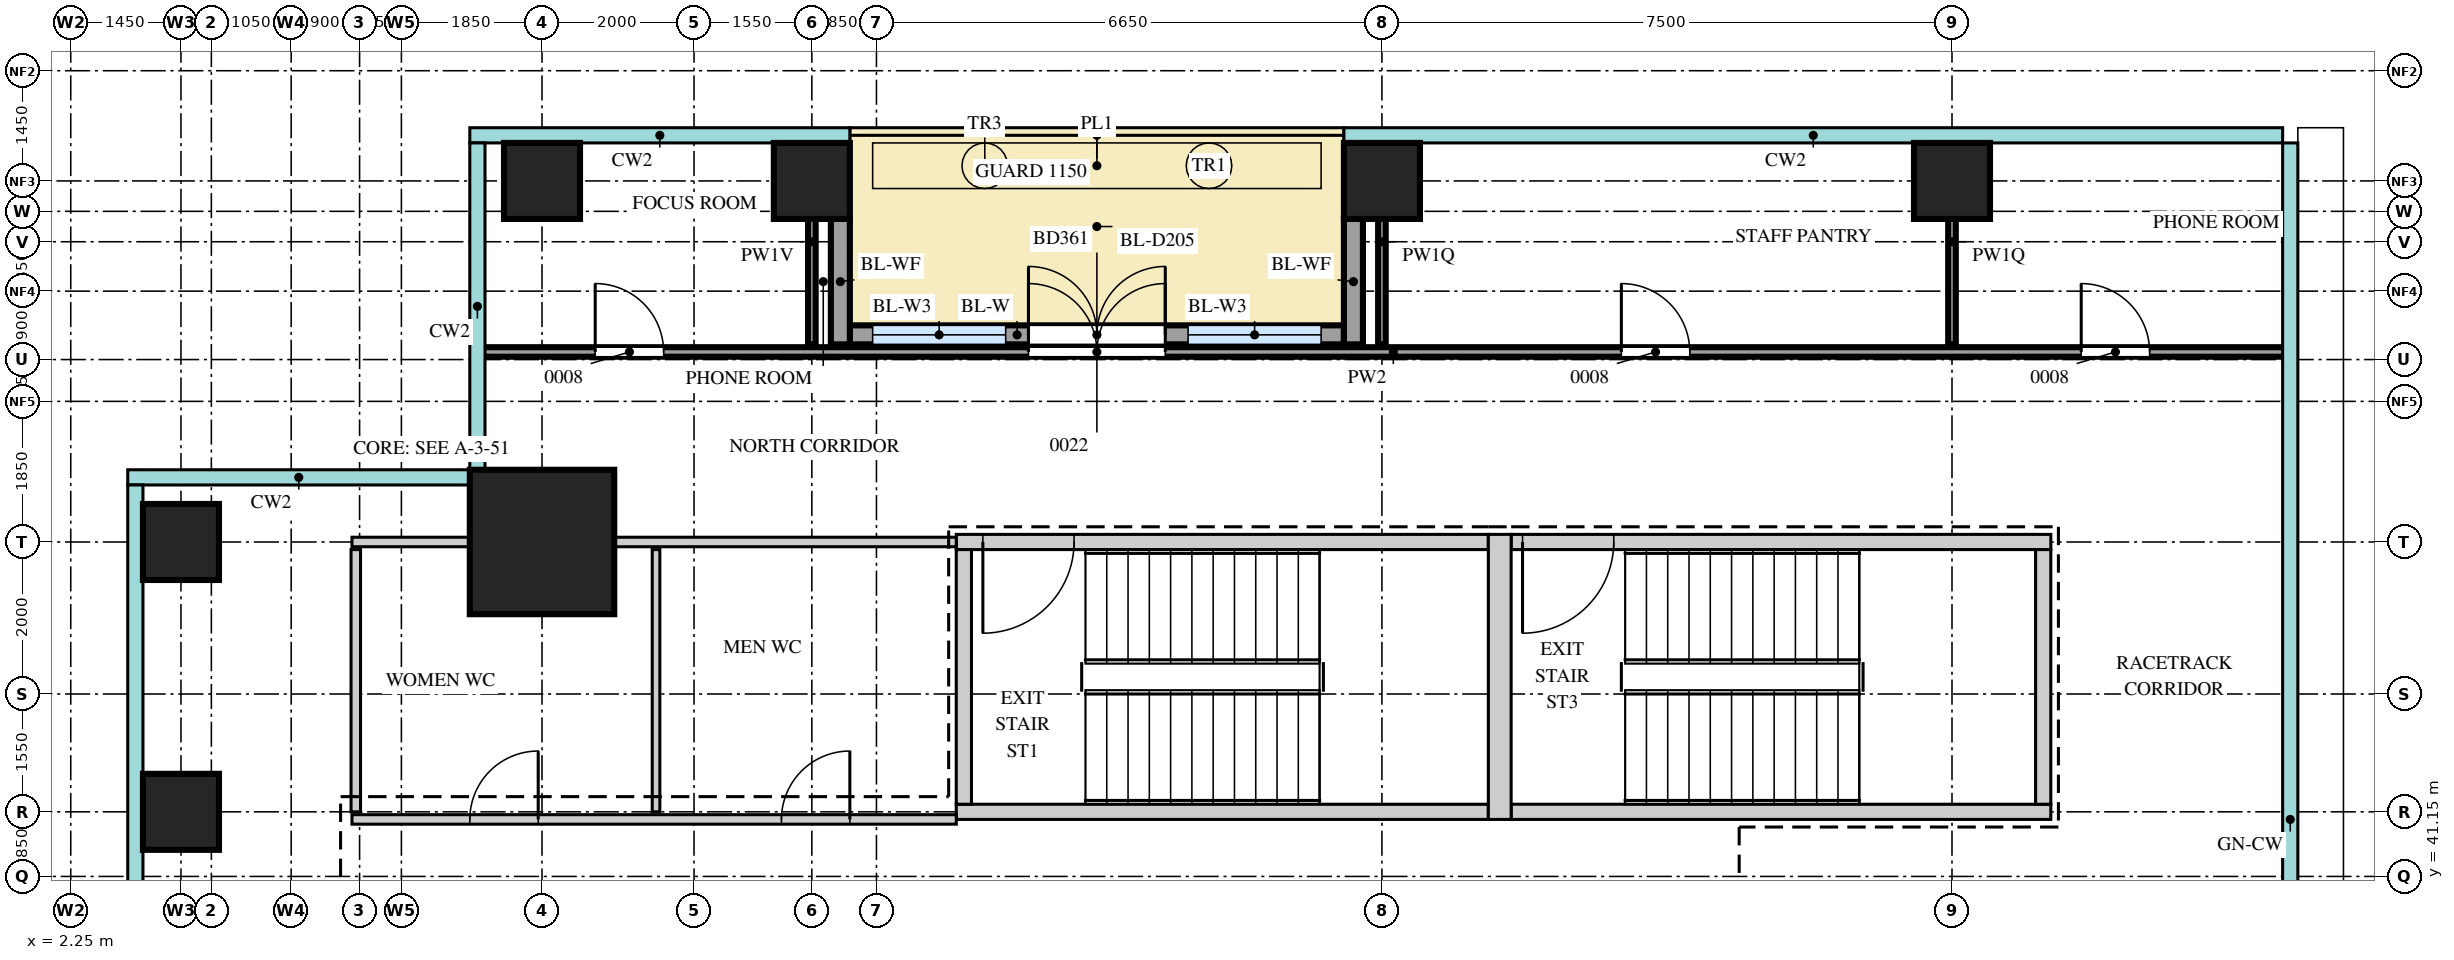
"""IFC4 building model, lengths in metres.
Left out: names, types, materials, properties, quantities, classifications, styles, units other than length and angle.
Written with IfcOpenShell. Run it as: python <this file> out.ifc"""

import sys

from ifc_helpers import new_model, si_unit, direction, frame, frame_2d, origin, origin_2d, place, context, subcontext, project, spatial, rectangle, extrude, source, transform, mapped, element, fill, save


model = new_model("IFC4")
c1 = context("Model", 3, precision=1e-05, world=origin(), true_north=direction((0.0, 1.0)))
c2 = subcontext(c1, "Body", "Model", "MODEL_VIEW")
j1 = project(units=[si_unit("LENGTHUNIT", "METRE"), si_unit("PLANEANGLEUNIT", "RADIAN")], contexts=[c1])
p1 = place(None, origin())
s1 = spatial("IfcSite", under=j1, at=p1, CompositionType="ELEMENT")
p2 = place(p1, origin())
s2 = spatial("IfcBuilding", under=s1, at=p2, CompositionType="ELEMENT")
p3 = place(p2, frame((0.0, 0.0, 168.7)))
s3 = spatial("IfcBuildingStorey", under=s2, at=p3, CompositionType="ELEMENT", Elevation=168.7)
m1 = source(origin(), c2, "Body", "SweptSolid", [
    extrude(rectangle(XDim=7.0, YDim=0.2, at=frame_2d((3.5, 0.0))), origin(), (0.0, 0.0, 1.0), 3.75),
])
p4 = place(p3, frame((13.9, 45.55, 0.0), z_axis=(0.0, 0.0, 1.0), x_axis=(1.0, 0.0, 0.0)))
e1 = element("IfcWall", 1, at=p4, inside=s3, PredefinedType="SHEAR", context=c2, shape_type="MappedRepresentation", body=[
    mapped(m1, transform((0.0, 0.0, 0.0))),
])
m2 = source(origin(), c2, "Body", "SweptSolid", [
    extrude(rectangle(XDim=1.2, YDim=2.1, at=frame_2d((0.6, 1.05))), frame((0.0, 0.11, 0.0), z_axis=(0.0, -1.0, 0.0), x_axis=(1.0, 0.0, 0.0)), (0.0, 0.0, 1.0), 0.22),
])
p5 = place(p4, frame((0.35, 0.0, 0.0)))
e2 = element("IfcOpeningElement", 2, at=p5, cuts=e1, PredefinedType="OPENING", context=c2, shape_type="MappedRepresentation", body=[
    mapped(m2, transform((0.0, 0.0, 0.0))),
])
p6 = place(p3, frame((13.9, 42.0, 0.0), z_axis=(0.0, 0.0, 1.0), x_axis=(1.0, 0.0, 0.0)))
e3 = element("IfcWall", 3, at=p6, inside=s3, PredefinedType="SHEAR", context=c2, shape_type="MappedRepresentation", body=[
    mapped(m1, transform((0.0, 0.0, 0.0))),
])
m3 = source(origin(), c2, "Body", "SweptSolid", [
    extrude(rectangle(XDim=7.1, YDim=0.2, at=frame_2d((3.55, 0.0))), origin(), (0.0, 0.0, 1.0), 3.75),
])
p7 = place(p3, frame((21.2, 45.55, 0.0), z_axis=(0.0, 0.0, 1.0), x_axis=(1.0, 0.0, 0.0)))
e4 = element("IfcWall", 4, at=p7, inside=s3, PredefinedType="SHEAR", context=c2, shape_type="MappedRepresentation", body=[
    mapped(m3, transform((0.0, 0.0, 0.0))),
])
p8 = place(p7, frame((0.15, 0.0, 0.0)))
e5 = element("IfcOpeningElement", 5, at=p8, cuts=e4, PredefinedType="OPENING", context=c2, shape_type="MappedRepresentation", body=[
    mapped(m2, transform((0.0, 0.0, 0.0))),
])
p9 = place(p3, frame((21.2, 42.0, 0.0), z_axis=(0.0, 0.0, 1.0), x_axis=(1.0, 0.0, 0.0)))
e6 = element("IfcWall", 6, at=p9, inside=s3, PredefinedType="SHEAR", context=c2, shape_type="MappedRepresentation", body=[
    mapped(m3, transform((0.0, 0.0, 0.0))),
])
m4 = source(origin(), c2, "Body", "SweptSolid", [
    extrude(rectangle(XDim=3.75, YDim=0.3, at=frame_2d((1.875, 0.0))), origin(), (0.0, 0.0, 1.0), 3.75),
])
p10 = place(p3, frame((21.05, 41.9, 0.0), z_axis=(0.0, 0.0, 1.0), x_axis=(0.0, 1.0, 0.0)))
e7 = element("IfcWall", 7, at=p10, inside=s3, PredefinedType="SHEAR", context=c2, shape_type="MappedRepresentation", body=[
    mapped(m4, transform((0.0, 0.0, 0.0))),
])
m5 = source(origin(), c2, "Body", "SweptSolid", [
    extrude(rectangle(XDim=3.35, YDim=0.2, at=frame_2d((1.675, 0.0))), origin(), (0.0, 0.0, 1.0), 3.75),
])
for number, where, z_axis, x_axis in (
    (8, (14.0, 42.1, 0.0), (0.0, 0.0, 1.0), (0.0, 1.0, 0.0)),
    (9, (28.2, 42.1, 0.0), (0.0, 0.0, 1.0), (0.0, 1.0, 0.0)),
):
    element("IfcWall", number, at=place(p3, frame(where, z_axis=z_axis, x_axis=x_axis)), inside=s3, PredefinedType="SHEAR", context=c2, shape_type="MappedRepresentation", body=[
        mapped(m5, transform((0.0, 0.0, 0.0))),
    ])
m6 = source(origin(), c2, "Body", "SweptSolid", [
    extrude(rectangle(XDim=1.9, YDim=1.9, at=origin_2d()), origin(), (0.0, 0.0, 1.0), 4.0),
])
p11 = place(p3, frame((8.45, 45.55, 0.0), z_axis=(0.0, 0.0, 1.0), x_axis=(1.0, 0.0, 0.0)))
e10 = element("IfcColumn", 10, at=p11, inside=s3, PredefinedType="COLUMN", context=c2, shape_type="MappedRepresentation", body=[
    mapped(m6, transform((0.0, 0.0, 0.0))),
])
m7 = source(origin(), c2, "Body", "SweptSolid", [
    extrude(rectangle(XDim=1.0, YDim=1.0, at=origin_2d()), origin(), (0.0, 0.0, 1.0), 3.75),
])
for number, where, z_axis, x_axis in (
    (11, (8.45, 50.3, 0.0), (0.0, 0.0, 1.0), (1.0, 0.0, 0.0)),
    (12, (12.0, 50.3, 0.0), (0.0, 0.0, 1.0), (1.0, 0.0, 0.0)),
    (13, (19.5, 50.3, 0.0), (0.0, 0.0, 1.0), (1.0, 0.0, 0.0)),
    (14, (27.0, 50.3, 0.0), (0.0, 0.0, 1.0), (1.0, 0.0, 0.0)),
    (15, (3.7, 42.0, 0.0), (0.0, 0.0, 1.0), (1.0, 0.0, 0.0)),
    (16, (3.7, 45.55, 0.0), (0.0, 0.0, 1.0), (1.0, 0.0, 0.0)),
):
    element("IfcColumn", number, at=place(p3, frame(where, z_axis=z_axis, x_axis=x_axis)), inside=s3, PredefinedType="COLUMN", context=c2, shape_type="MappedRepresentation", body=[
        mapped(m7, transform((0.0, 0.0, 0.0))),
    ])
m8 = source(origin(), c2, "Body", "SweptSolid", [
    extrude(rectangle(XDim=6.5, YDim=0.25, at=frame_2d((3.25, 0.0))), origin(), (0.0, 0.0, 1.0), 3.75),
])
p12 = place(p3, frame((12.5, 48.275, 0.0), z_axis=(0.0, 0.0, 1.0), x_axis=(1.0, 0.0, 0.0)))
e17 = element("IfcWall", 17, at=p12, inside=s3, PredefinedType="SOLIDWALL", context=c2, shape_type="MappedRepresentation", body=[
    mapped(m8, transform((0.0, 0.0, 0.0))),
])
m9 = source(origin(), c2, "Body", "SweptSolid", [
    extrude(rectangle(XDim=1.75, YDim=2.4, at=frame_2d((0.875, 1.2))), frame((0.0, 0.135, 0.0), z_axis=(0.0, -1.0, 0.0), x_axis=(1.0, 0.0, 0.0)), (0.0, 0.0, 1.0), 0.27),
])
p13 = place(p12, frame((0.3, 0.0, 0.0)))
e18 = element("IfcOpeningElement", 18, at=p13, cuts=e17, PredefinedType="OPENING", context=c2, shape_type="MappedRepresentation", body=[
    mapped(m9, transform((0.0, 0.0, 0.0))),
])
p14 = place(p12, frame((4.45, 0.0, 0.0)))
e19 = element("IfcOpeningElement", 19, at=p14, cuts=e17, PredefinedType="OPENING", context=c2, shape_type="MappedRepresentation", body=[
    mapped(m9, transform((0.0, 0.0, 0.0))),
])
m10 = source(origin(), c2, "Body", "SweptSolid", [
    extrude(rectangle(XDim=1.8, YDim=2.4, at=frame_2d((0.9, 1.2))), frame((0.0, 0.135, 0.0), z_axis=(0.0, -1.0, 0.0), x_axis=(1.0, 0.0, 0.0)), (0.0, 0.0, 1.0), 0.27),
])
p15 = place(p12, frame((2.35, 0.0, 0.0)))
e20 = element("IfcOpeningElement", 20, at=p15, cuts=e17, PredefinedType="OPENING", context=c2, shape_type="MappedRepresentation", body=[
    mapped(m10, transform((0.0, 0.0, 0.0))),
])
m11 = source(origin(), c2, "Body", "SweptSolid", [
    extrude(rectangle(XDim=1.65, YDim=0.25, at=frame_2d((0.825, 0.0))), origin(), (0.0, 0.0, 1.0), 3.45),
])
for number, where, z_axis, x_axis in (
    (21, (12.375, 49.8, 0.0), (0.0, 0.0, 1.0), (0.0, -1.0, 0.0)),
    (22, (19.125, 49.8, 0.0), (0.0, 0.0, 1.0), (0.0, -1.0, 0.0)),
):
    element("IfcWall", number, at=place(p3, frame(where, z_axis=z_axis, x_axis=x_axis)), inside=s3, PredefinedType="SOLIDWALL", context=c2, shape_type="MappedRepresentation", body=[
        mapped(m11, transform((0.0, 0.0, 0.0))),
    ])
m12 = source(origin(), c2, "Body", "SweptSolid", [
    extrude(rectangle(XDim=7.95, YDim=0.125, at=frame_2d((3.975, 0.0))), origin(), (0.0, 0.0, 1.0), 3.8),
])
p16 = place(p3, frame((5.95, 41.9, 0.0), z_axis=(0.0, 0.0, 1.0), x_axis=(1.0, 0.0, 0.0)))
e23 = element("IfcWall", 23, at=p16, inside=s3, PredefinedType="PARTITIONING", context=c2, shape_type="MappedRepresentation", body=[
    mapped(m12, transform((0.0, 0.0, 0.0))),
])
m13 = source(origin(), c2, "Body", "SweptSolid", [
    extrude(rectangle(XDim=0.9, YDim=2.1, at=frame_2d((0.45, 1.05))), frame((0.0, 0.073, 0.0), z_axis=(0.0, -1.0, 0.0), x_axis=(1.0, 0.0, 0.0)), (0.0, 0.0, 1.0), 0.145),
])
p17 = place(p16, frame((1.55, 0.0, 0.0)))
e24 = element("IfcOpeningElement", 24, at=p17, cuts=e23, PredefinedType="OPENING", context=c2, shape_type="MappedRepresentation", body=[
    mapped(m13, transform((0.0, 0.0, 0.0))),
])
p18 = place(p16, frame((5.65, 0.0, 0.0)))
e25 = element("IfcOpeningElement", 25, at=p18, cuts=e23, PredefinedType="OPENING", context=c2, shape_type="MappedRepresentation", body=[
    mapped(m13, transform((0.0, 0.0, 0.0))),
])
m14 = source(origin(), c2, "Body", "SweptSolid", [
    extrude(rectangle(XDim=3.45, YDim=0.125, at=frame_2d((1.725, 0.0))), origin(), (0.0, 0.0, 1.0), 3.8),
])
p19 = place(p3, frame((6.0, 42.0, 0.0), z_axis=(0.0, 0.0, 1.0), x_axis=(0.0, 1.0, 0.0)))
e26 = element("IfcWall", 26, at=p19, inside=s3, PredefinedType="PARTITIONING", context=c2, shape_type="MappedRepresentation", body=[
    mapped(m14, transform((0.0, 0.0, 0.0))),
])
m15 = source(origin(), c2, "Body", "SweptSolid", [
    extrude(rectangle(XDim=3.45, YDim=0.1, at=frame_2d((1.725, 0.0))), origin(), (0.0, 0.0, 1.0), 3.8),
])
p20 = place(p3, frame((9.95, 42.0, 0.0), z_axis=(0.0, 0.0, 1.0), x_axis=(0.0, 1.0, 0.0)))
e27 = element("IfcWall", 27, at=p20, inside=s3, PredefinedType="PARTITIONING", context=c2, shape_type="MappedRepresentation", body=[
    mapped(m15, transform((0.0, 0.0, 0.0))),
])
m16 = source(origin(), c2, "Body", "SweptSolid", [
    extrude(rectangle(XDim=7.95, YDim=0.125, at=frame_2d((3.975, 0.0))), origin(), (0.0, 0.0, 1.0), 3.25),
])
p21 = place(p3, frame((5.95, 45.55, 0.0), z_axis=(0.0, 0.0, 1.0), x_axis=(1.0, 0.0, 0.0)))
e28 = element("IfcWall", 28, at=p21, inside=s3, PredefinedType="PARTITIONING", context=c2, shape_type="MappedRepresentation", body=[
    mapped(m16, transform((0.0, 0.0, 0.0))),
])
m17 = source(origin(), c2, "Body", "SweptSolid", [
    extrude(rectangle(XDim=23.75, YDim=0.125, at=frame_2d((11.875, 0.0))), origin(), (0.0, 0.0, 1.0), 3.8),
])
p22 = place(p3, frame((7.65, 48.05, 0.0), z_axis=(0.0, 0.0, 1.0), x_axis=(1.0, 0.0, 0.0)))
e29 = element("IfcWall", 29, at=p22, inside=s3, PredefinedType="PARTITIONING", context=c2, shape_type="MappedRepresentation", body=[
    mapped(m17, transform((0.0, 0.0, 0.0))),
])
p23 = place(p22, frame((1.5, 0.0, 0.0)))
e30 = element("IfcOpeningElement", 30, at=p23, cuts=e29, PredefinedType="OPENING", context=c2, shape_type="MappedRepresentation", body=[
    mapped(m13, transform((0.0, 0.0, 0.0))),
])
m18 = source(origin(), c2, "Body", "SweptSolid", [
    extrude(rectangle(XDim=1.8, YDim=2.1, at=frame_2d((0.9, 1.05))), frame((0.0, 0.073, 0.0), z_axis=(0.0, -1.0, 0.0), x_axis=(1.0, 0.0, 0.0)), (0.0, 0.0, 1.0), 0.145),
])
p24 = place(p22, frame((7.2, 0.0, 0.0)))
e31 = element("IfcOpeningElement", 31, at=p24, cuts=e29, PredefinedType="OPENING", context=c2, shape_type="MappedRepresentation", body=[
    mapped(m18, transform((0.0, 0.0, 0.0))),
])
p25 = place(p22, frame((15.0, 0.0, 0.0)))
e32 = element("IfcOpeningElement", 32, at=p25, cuts=e29, PredefinedType="OPENING", context=c2, shape_type="MappedRepresentation", body=[
    mapped(m13, transform((0.0, 0.0, 0.0))),
])
p26 = place(p22, frame((21.05, 0.0, 0.0)))
e33 = element("IfcOpeningElement", 33, at=p26, cuts=e29, PredefinedType="OPENING", context=c2, shape_type="MappedRepresentation", body=[
    mapped(m13, transform((0.0, 0.0, 0.0))),
])
m19 = source(origin(), c2, "Body", "SweptSolid", [
    extrude(rectangle(XDim=2.7, YDim=0.1, at=frame_2d((1.35, 0.0))), origin(), (0.0, 0.0, 1.0), 3.25),
])
p27 = place(p3, frame((12.0, 48.15, 0.0), z_axis=(0.0, 0.0, 1.0), x_axis=(0.0, 1.0, 0.0)))
e34 = element("IfcWall", 34, at=p27, inside=s3, PredefinedType="PARTITIONING", context=c2, shape_type="MappedRepresentation", body=[
    mapped(m19, transform((0.0, 0.0, 0.0))),
])
m20 = source(origin(), c2, "Body", "SweptSolid", [
    extrude(rectangle(XDim=2.7, YDim=0.1, at=frame_2d((1.35, 0.0))), origin(), (0.0, 0.0, 1.0), 3.42),
])
for number, where, z_axis, x_axis in (
    (35, (19.5, 48.15, 0.0), (0.0, 0.0, 1.0), (0.0, 1.0, 0.0)),
    (36, (27.0, 48.15, 0.0), (0.0, 0.0, 1.0), (0.0, 1.0, 0.0)),
):
    element("IfcWall", number, at=place(p3, frame(where, z_axis=z_axis, x_axis=x_axis)), inside=s3, PredefinedType="PARTITIONING", context=c2, shape_type="MappedRepresentation", body=[
        mapped(m20, transform((0.0, 0.0, 0.0))),
    ])
m21 = source(origin(), c2, "Body", "SweptSolid", [
    extrude(rectangle(XDim=1.75, YDim=2.4, at=frame_2d((0.875, 1.2))), frame((0.0, 0.03, 0.0), z_axis=(0.0, -1.0, 0.0), x_axis=(1.0, 0.0, 0.0)), (0.0, 0.0, 1.0), 0.06),
])
p28 = place(p13, origin())
e37 = element("IfcWindow", 37, at=p28, inside=s3, PartitioningType="SINGLE_PANEL", PredefinedType="WINDOW", context=c2, shape_type="MappedRepresentation", body=[
    mapped(m21, transform((0.0, 0.0, 0.0))),
])
fill(e18, e37)
p29 = place(p14, origin())
e38 = element("IfcWindow", 38, at=p29, inside=s3, PartitioningType="SINGLE_PANEL", PredefinedType="WINDOW", context=c2, shape_type="MappedRepresentation", body=[
    mapped(m21, transform((0.0, 0.0, 0.0))),
])
fill(e19, e38)
m22 = source(origin(), c2, "Body", "SweptSolid", [
    extrude(rectangle(XDim=1.8, YDim=2.4, at=frame_2d((0.9, 1.2))), frame((0.0, 0.025, 0.0), z_axis=(0.0, -1.0, 0.0), x_axis=(1.0, 0.0, 0.0)), (0.0, 0.0, 1.0), 0.05),
])
p30 = place(p15, origin())
e39 = element("IfcDoor", 39, at=p30, inside=s3, OperationType="DOUBLE_DOOR_DOUBLE_SWING", PredefinedType="DOOR", context=c2, shape_type="MappedRepresentation", body=[
    mapped(m22, transform((0.0, 0.0, 0.0))),
])
fill(e20, e39)
m23 = source(origin(), c2, "Body", "SweptSolid", [
    extrude(rectangle(XDim=0.9, YDim=2.1, at=frame_2d((0.45, 1.05))), frame((0.0, 0.025, 0.0), z_axis=(0.0, -1.0, 0.0), x_axis=(1.0, 0.0, 0.0)), (0.0, 0.0, 1.0), 0.05),
])
p31 = place(p17, origin())
e40 = element("IfcDoor", 40, at=p31, inside=s3, OperationType="SINGLE_SWING_LEFT", PredefinedType="DOOR", context=c2, shape_type="MappedRepresentation", body=[
    mapped(m23, transform((0.0, 0.0, 0.0))),
])
fill(e24, e40)
p32 = place(p18, origin())
e41 = element("IfcDoor", 41, at=p32, inside=s3, OperationType="SINGLE_SWING_LEFT", PredefinedType="DOOR", context=c2, shape_type="MappedRepresentation", body=[
    mapped(m23, transform((0.0, 0.0, 0.0))),
])
fill(e25, e41)
p33 = place(p23, origin())
e42 = element("IfcDoor", 42, at=p33, inside=s3, OperationType="SINGLE_SWING_RIGHT", PredefinedType="DOOR", context=c2, shape_type="MappedRepresentation", body=[
    mapped(m23, transform((0.0, 0.0, 0.0))),
])
fill(e30, e42)
m24 = source(origin(), c2, "Body", "SweptSolid", [
    extrude(rectangle(XDim=1.8, YDim=2.1, at=frame_2d((0.9, 1.05))), frame((0.0, 0.025, 0.0), z_axis=(0.0, -1.0, 0.0), x_axis=(1.0, 0.0, 0.0)), (0.0, 0.0, 1.0), 0.05),
])
p34 = place(p24, origin())
e43 = element("IfcDoor", 43, at=p34, inside=s3, OperationType="DOUBLE_DOOR_SINGLE_SWING", PredefinedType="DOOR", context=c2, shape_type="MappedRepresentation", body=[
    mapped(m24, transform((0.0, 0.0, 0.0))),
])
fill(e31, e43)
p35 = place(p25, origin())
e44 = element("IfcDoor", 44, at=p35, inside=s3, OperationType="SINGLE_SWING_RIGHT", PredefinedType="DOOR", context=c2, shape_type="MappedRepresentation", body=[
    mapped(m23, transform((0.0, 0.0, 0.0))),
])
fill(e32, e44)
p36 = place(p26, origin())
e45 = element("IfcDoor", 45, at=p36, inside=s3, OperationType="SINGLE_SWING_RIGHT", PredefinedType="DOOR", context=c2, shape_type="MappedRepresentation", body=[
    mapped(m23, transform((0.0, 0.0, 0.0))),
])
fill(e33, e45)
m25 = source(origin(), c2, "Body", "SweptSolid", [
    extrude(rectangle(XDim=1.2, YDim=2.1, at=frame_2d((0.6, 1.05))), frame((0.0, 0.025, 0.0), z_axis=(0.0, -1.0, 0.0), x_axis=(1.0, 0.0, 0.0)), (0.0, 0.0, 1.0), 0.05),
])
p37 = place(p5, origin())
e46 = element("IfcDoor", 46, at=p37, inside=s3, OperationType="SINGLE_SWING_LEFT", PredefinedType="DOOR", context=c2, shape_type="MappedRepresentation", body=[
    mapped(m25, transform((0.0, 0.0, 0.0))),
])
fill(e2, e46)
p38 = place(p8, origin())
e47 = element("IfcDoor", 47, at=p38, inside=s3, OperationType="SINGLE_SWING_LEFT", PredefinedType="DOOR", context=c2, shape_type="MappedRepresentation", body=[
    mapped(m25, transform((0.0, 0.0, 0.0))),
])
fill(e5, e47)
save(model, sys.argv[1])
